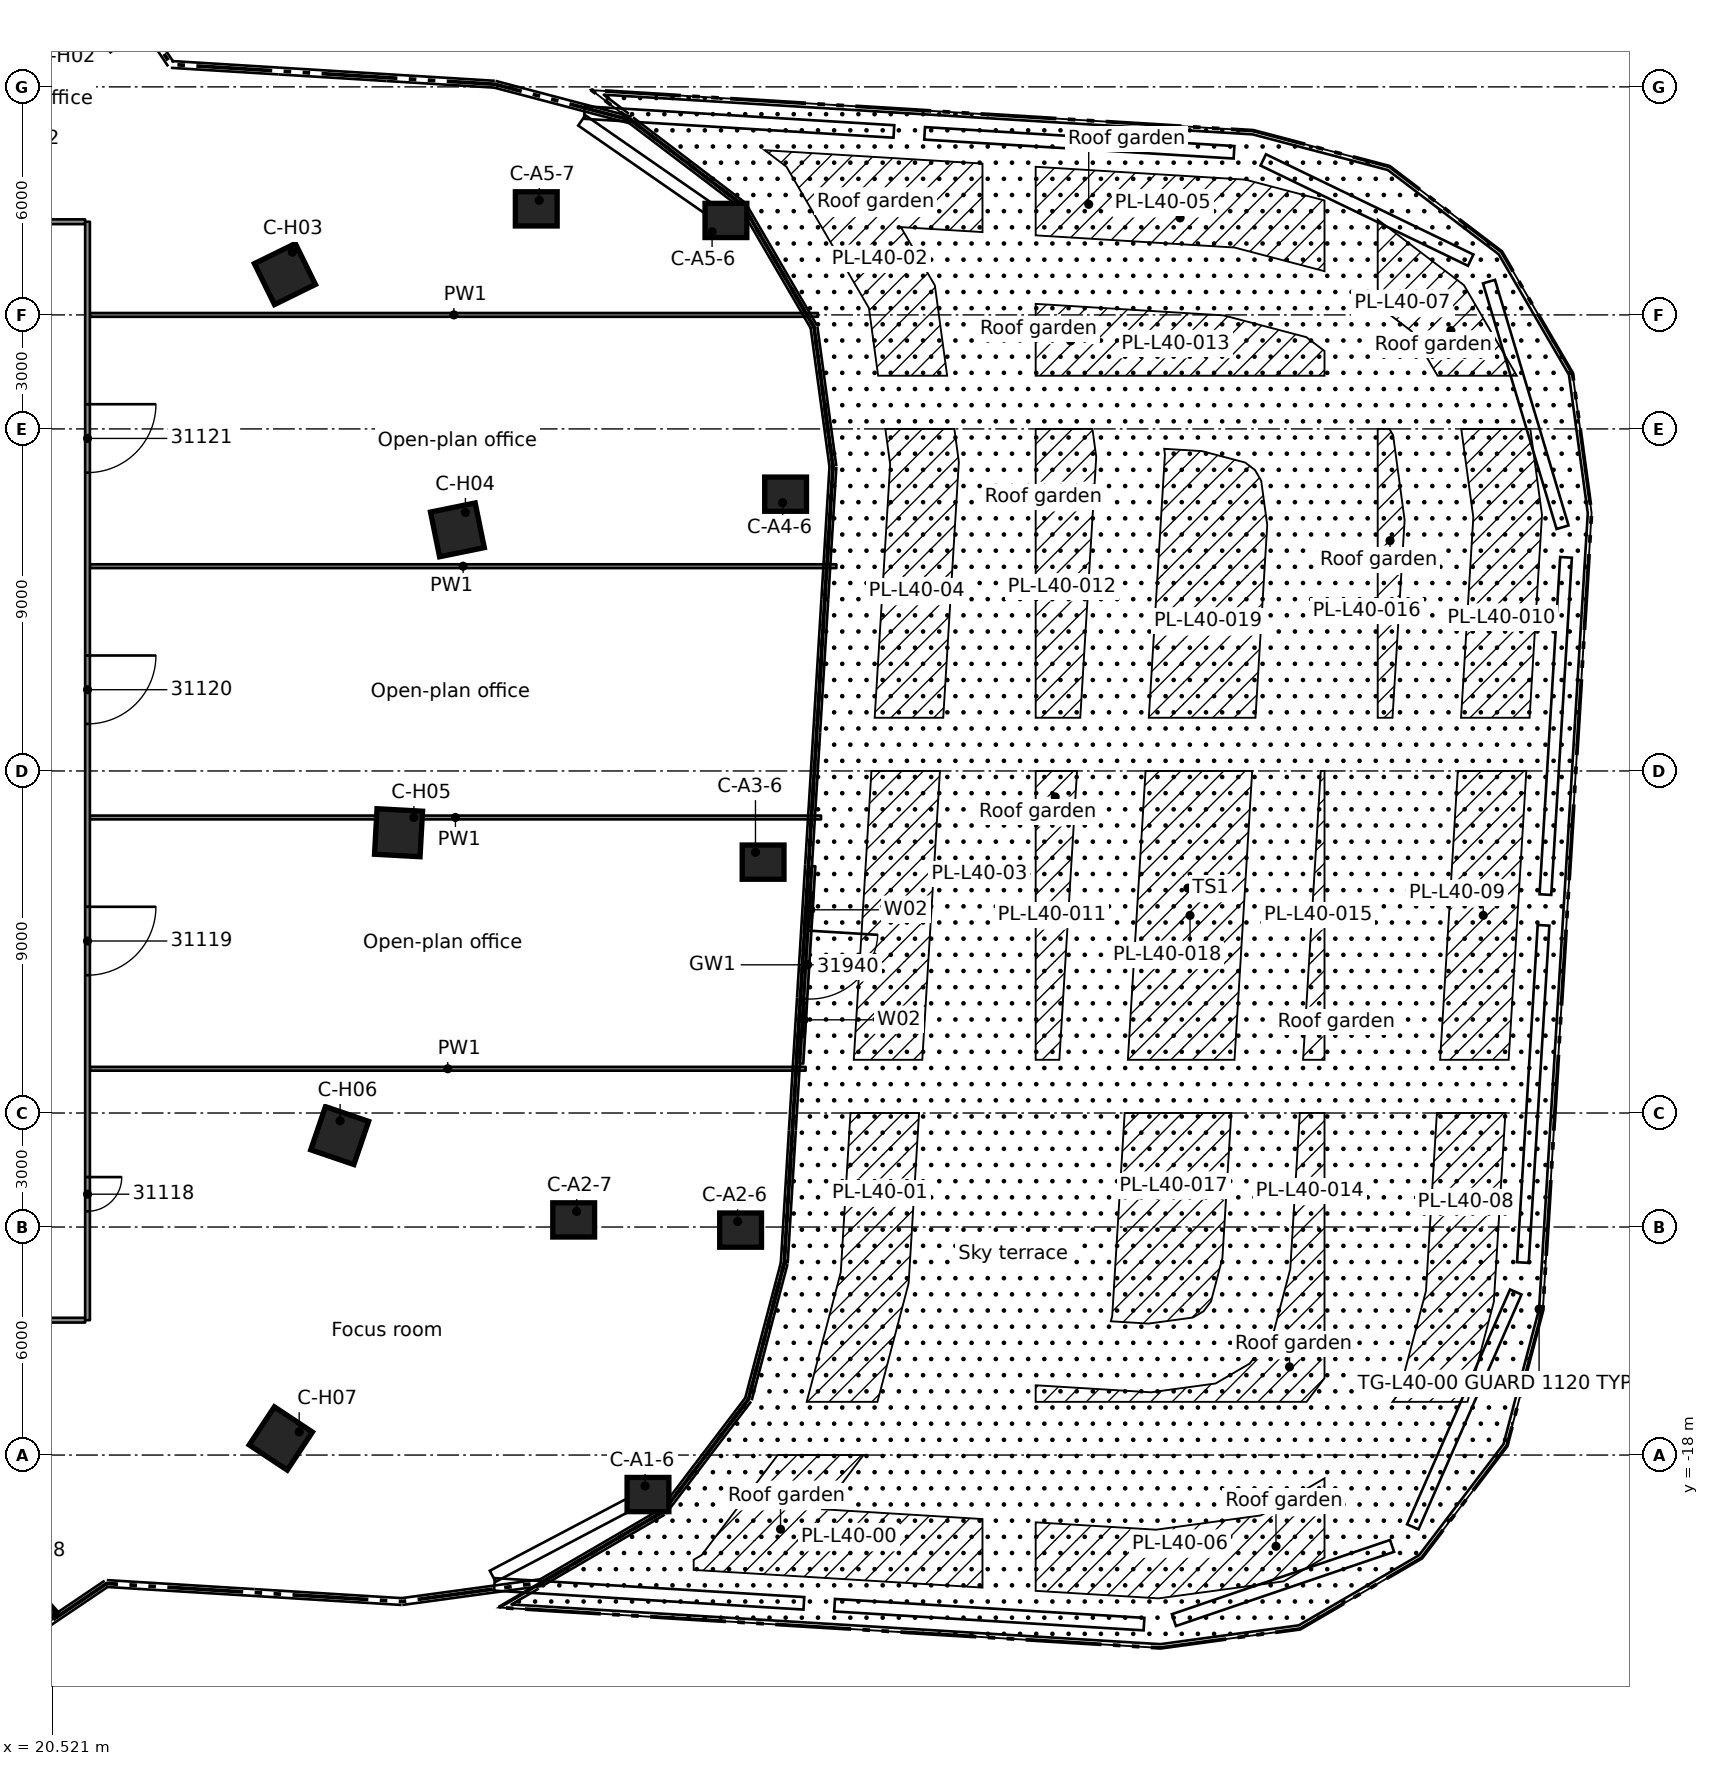
"""IFC4 building model, lengths in metres.
Left out: names, types, materials, properties, quantities, classifications, styles, units other than length and angle.
Written with IfcOpenShell. Run it as: python <this file> out.ifc"""

import sys

from ifc_helpers import new_model, si_unit, direction, frame, frame_2d, origin, origin_2d, place, context, subcontext, project, spatial, rectangle, extrude, element, fill, save


model = new_model("IFC4")
c1 = context("Model", 3, precision=1e-05, world=origin(), true_north=direction((0.0, 1.0)))
c2 = subcontext(c1, "Body", "Model", "MODEL_VIEW")
j1 = project(units=[si_unit("LENGTHUNIT", "METRE"), si_unit("PLANEANGLEUNIT", "RADIAN")], contexts=[c1])
p1 = place(None, origin())
s1 = spatial("IfcSite", under=j1, at=p1, CompositionType="ELEMENT")
p2 = place(p1, origin())
s2 = spatial("IfcBuilding", under=s1, at=p2, CompositionType="ELEMENT")
p3 = place(p2, frame((0.0, 0.0, 156.1)))
s3 = spatial("IfcBuildingStorey", under=s2, at=p3, CompositionType="ELEMENT", Elevation=156.1)
for number, where, z_axis, x_axis in (
    (1, (36.198, -19.039, 0.0), (0.0, 0.0, 1.0), (1.0, 0.0, 0.0)),
    (2, (38.635, -12.081, 0.0), (0.0, 0.0, 1.0), (1.0, 0.0, 0.0)),
    (3, (34.243, -11.813, 0.0), (0.0, 0.0, 1.0), (1.0, 0.0, 0.0)),
    (4, (39.227, -2.399, 0.0), (0.0, 0.0, 1.0), (1.0, 0.0, 0.0)),
    (5, (39.819, 7.283, 0.0), (0.0, 0.0, 1.0), (1.0, 0.0, 0.0)),
    (6, (38.249, 14.485, 0.0), (0.0, 0.0, 1.0), (1.0, 0.0, 0.0)),
    (7, (33.258, 14.79, 0.0), (0.0, 0.0, 1.0), (1.0, 0.0, 0.0)),
):
    element("IfcColumn", number, at=place(p3, frame(where, z_axis=z_axis, x_axis=x_axis)), inside=s3, PredefinedType="COLUMN", context=c2, shape_type="SweptSolid", body=[
        extrude(rectangle(XDim=1.1, YDim=0.9, at=origin_2d()), origin(), (0.0, 0.0, 1.0), 3.5),
    ])
for number, where, z_axis, x_axis in (
    (8, (26.644, 13.075, 0.0), (0.0, 0.0, 1.0), (0.898, 0.441, 0.0)),
    (9, (31.183, 6.344, 0.0), (0.0, 0.0, 1.0), (0.98, 0.199, 0.0)),
    (10, (29.634, -1.625, 0.0), (0.0, 0.0, 1.0), (0.998, -0.055, 0.0)),
    (11, (28.085, -9.594, 0.0), (0.0, 0.0, 1.0), (0.946, -0.323, 0.0)),
    (12, (26.536, -17.564, 0.0), (0.0, 0.0, 1.0), (0.834, -0.552, 0.0)),
    (13, (19.806, -22.104, 0.0), (0.0, 0.0, 1.0), (0.667, -0.745, 0.0)),
):
    element("IfcColumn", number, at=place(p3, frame(where, z_axis=z_axis, x_axis=x_axis)), inside=s3, PredefinedType="COLUMN", context=c2, shape_type="SweptSolid", body=[
        extrude(rectangle(XDim=1.2, YDim=1.2, at=origin_2d()), origin(), (0.0, 0.0, 1.0), 3.5),
    ])
p4 = place(p3, frame((40.552, -2.505, 0.0), z_axis=(0.0, 0.0, 1.0), x_axis=(-0.061033697925, -0.998135706063, 0.0)))
e14 = element("IfcWall", 14, at=p4, inside=s3, PredefinedType="STANDARD", context=c2, shape_type="SweptSolid", body=[
    extrude(rectangle(XDim=5.2, YDim=0.1, at=frame_2d((2.6, 0.0))), origin(), (0.0, 0.0, 1.0), 3.1),
])
p5 = place(p4, frame((1.7, 0.0, 0.0)))
e15 = element("IfcOpeningElement", 15, at=p5, cuts=e14, PredefinedType="OPENING", context=c2, shape_type="SweptSolid", body=[
    extrude(rectangle(XDim=1.8, YDim=2.4, at=frame_2d((0.9, 1.2))), frame((0.0, 0.06, 0.0), z_axis=(0.0, -1.0, 0.0), x_axis=(1.0, 0.0, 0.0)), (0.0, 0.0, 1.0), 0.12),
])
p6 = place(p4, frame((0.7, 0.0, 0.0)))
e16 = element("IfcOpeningElement", 16, at=p6, cuts=e14, PredefinedType="OPENING", context=c2, shape_type="SweptSolid", body=[
    extrude(rectangle(XDim=0.9, YDim=2.4, at=frame_2d((0.45, 1.2))), frame((0.0, 0.06, 0.0), z_axis=(0.0, -1.0, 0.0), x_axis=(1.0, 0.0, 0.0)), (0.0, 0.0, 1.0), 0.12),
])
p7 = place(p4, frame((3.6, 0.0, 0.0)))
e17 = element("IfcOpeningElement", 17, at=p7, cuts=e14, PredefinedType="OPENING", context=c2, shape_type="SweptSolid", body=[
    extrude(rectangle(XDim=0.9, YDim=2.4, at=frame_2d((0.45, 1.2))), frame((0.0, 0.06, 0.0), z_axis=(0.0, -1.0, 0.0), x_axis=(1.0, 0.0, 0.0)), (0.0, 0.0, 1.0), 0.12),
])
p8 = place(p3, frame((21.387, -14.451, 0.0), z_axis=(0.0, 0.0, 1.0), x_axis=(-1.0, 0.0, 0.0)))
e18 = element("IfcWall", 18, at=p8, inside=s3, PredefinedType="PARTITIONING", context=c2, shape_type="SweptSolid", body=[
    extrude(rectangle(XDim=10.996, YDim=0.125, at=frame_2d((5.498, 0.0))), origin(), (0.0, 0.0, 1.0), 3.08),
])
p9 = place(p8, frame((7.816, 0.0, 0.0)))
e19 = element("IfcOpeningElement", 19, at=p9, cuts=e18, PredefinedType="OPENING", context=c2, shape_type="SweptSolid", body=[
    extrude(rectangle(XDim=0.9, YDim=2.1, at=frame_2d((0.45, 1.05))), frame((0.0, 0.073, 0.0), z_axis=(0.0, -1.0, 0.0), x_axis=(1.0, 0.0, 0.0)), (0.0, 0.0, 1.0), 0.145),
])
p10 = place(p8, frame((2.288, 0.0, 0.0)))
e20 = element("IfcOpeningElement", 20, at=p10, cuts=e18, PredefinedType="OPENING", context=c2, shape_type="SweptSolid", body=[
    extrude(rectangle(XDim=0.9, YDim=2.1, at=frame_2d((0.45, 1.05))), frame((0.0, 0.073, 0.0), z_axis=(0.0, -1.0, 0.0), x_axis=(1.0, 0.0, 0.0)), (0.0, 0.0, 1.0), 0.145),
])
p11 = place(p3, frame((21.512, -7.836, 0.0), z_axis=(0.0, 0.0, 1.0), x_axis=(1.0, 0.0, 0.0)))
e21 = element("IfcWall", 21, at=p11, inside=s3, PredefinedType="PARTITIONING", context=c2, shape_type="SweptSolid", body=[
    extrude(rectangle(XDim=18.834, YDim=0.1, at=frame_2d((9.417, 0.0))), origin(), (0.0, 0.0, 1.0), 3.08),
])
p12 = place(p3, frame((21.512, -1.224, 0.0), z_axis=(0.0, 0.0, 1.0), x_axis=(1.0, 0.0, 0.0)))
e22 = element("IfcWall", 22, at=p12, inside=s3, PredefinedType="PARTITIONING", context=c2, shape_type="SweptSolid", body=[
    extrude(rectangle(XDim=19.239, YDim=0.1, at=frame_2d((9.62, 0.0))), origin(), (0.0, 0.0, 1.0), 3.08),
])
p13 = place(p3, frame((21.512, 5.388, 0.0), z_axis=(0.0, 0.0, 1.0), x_axis=(1.0, 0.0, 0.0)))
e23 = element("IfcWall", 23, at=p13, inside=s3, PredefinedType="PARTITIONING", context=c2, shape_type="SweptSolid", body=[
    extrude(rectangle(XDim=19.643, YDim=0.1, at=frame_2d((9.822, 0.0))), origin(), (0.0, 0.0, 1.0), 3.08),
])
p14 = place(p3, frame((21.512, 12.0, 0.0), z_axis=(0.0, 0.0, 1.0), x_axis=(1.0, 0.0, 0.0)))
e24 = element("IfcWall", 24, at=p14, inside=s3, PredefinedType="PARTITIONING", context=c2, shape_type="SweptSolid", body=[
    extrude(rectangle(XDim=19.157, YDim=0.1, at=frame_2d((9.579, 0.0))), origin(), (0.0, 0.0, 1.0), 3.08),
])
p15 = place(p3, frame((10.391, 14.451, 0.0), z_axis=(0.0, 0.0, 1.0), x_axis=(1.0, 0.0, 0.0)))
e25 = element("IfcWall", 25, at=p15, inside=s3, PredefinedType="PARTITIONING", context=c2, shape_type="SweptSolid", body=[
    extrude(rectangle(XDim=10.996, YDim=0.125, at=frame_2d((5.498, 0.0))), origin(), (0.0, 0.0, 1.0), 3.08),
])
p16 = place(p15, frame((7.38, 0.0, 0.0)))
e26 = element("IfcOpeningElement", 26, at=p16, cuts=e25, PredefinedType="OPENING", context=c2, shape_type="SweptSolid", body=[
    extrude(rectangle(XDim=1.8, YDim=2.1, at=frame_2d((0.9, 1.05))), frame((0.0, 0.073, 0.0), z_axis=(0.0, -1.0, 0.0), x_axis=(1.0, 0.0, 0.0)), (0.0, 0.0, 1.0), 0.145),
])
p17 = place(p3, frame((21.45, 14.451, 0.0), z_axis=(0.0, 0.0, 1.0), x_axis=(0.0, -1.0, 0.0)))
e27 = element("IfcWall", 27, at=p17, inside=s3, PredefinedType="PARTITIONING", context=c2, shape_type="SweptSolid", body=[
    extrude(rectangle(XDim=28.902, YDim=0.125, at=frame_2d((14.451, 0.0))), origin(), (0.0, 0.0, 1.0), 3.08),
])
p18 = place(p17, frame((25.137, 0.0, 0.0)))
e28 = element("IfcOpeningElement", 28, at=p18, cuts=e27, PredefinedType="OPENING", context=c2, shape_type="SweptSolid", body=[
    extrude(rectangle(XDim=0.9, YDim=2.1, at=frame_2d((0.45, 1.05))), frame((0.0, 0.073, 0.0), z_axis=(0.0, -1.0, 0.0), x_axis=(1.0, 0.0, 0.0)), (0.0, 0.0, 1.0), 0.145),
])
p19 = place(p17, frame((18.025, 0.0, 0.0)))
e29 = element("IfcOpeningElement", 29, at=p19, cuts=e27, PredefinedType="OPENING", context=c2, shape_type="SweptSolid", body=[
    extrude(rectangle(XDim=1.8, YDim=2.1, at=frame_2d((0.9, 1.05))), frame((0.0, 0.073, 0.0), z_axis=(0.0, -1.0, 0.0), x_axis=(1.0, 0.0, 0.0)), (0.0, 0.0, 1.0), 0.145),
])
p20 = place(p17, frame((11.413, 0.0, 0.0)))
e30 = element("IfcOpeningElement", 30, at=p20, cuts=e27, PredefinedType="OPENING", context=c2, shape_type="SweptSolid", body=[
    extrude(rectangle(XDim=1.8, YDim=2.1, at=frame_2d((0.9, 1.05))), frame((0.0, 0.073, 0.0), z_axis=(0.0, -1.0, 0.0), x_axis=(1.0, 0.0, 0.0)), (0.0, 0.0, 1.0), 0.145),
])
p21 = place(p17, frame((4.801, 0.0, 0.0)))
e31 = element("IfcOpeningElement", 31, at=p21, cuts=e27, PredefinedType="OPENING", context=c2, shape_type="SweptSolid", body=[
    extrude(rectangle(XDim=1.8, YDim=2.1, at=frame_2d((0.9, 1.05))), frame((0.0, 0.073, 0.0), z_axis=(0.0, -1.0, 0.0), x_axis=(1.0, 0.0, 0.0)), (0.0, 0.0, 1.0), 0.145),
])
p22 = place(p5, origin())
e32 = element("IfcDoor", 32, at=p22, inside=s3, OperationType="DOUBLE_DOOR_SINGLE_SWING", PredefinedType="DOOR", context=c2, shape_type="SweptSolid", body=[
    extrude(rectangle(XDim=1.8, YDim=2.4, at=frame_2d((0.9, 1.2))), frame((0.0, 0.025, 0.0), z_axis=(0.0, -1.0, 0.0), x_axis=(1.0, 0.0, 0.0)), (0.0, 0.0, 1.0), 0.05),
])
fill(e15, e32)
p23 = place(p6, origin())
e33 = element("IfcWindow", 33, at=p23, inside=s3, PartitioningType="SINGLE_PANEL", PredefinedType="WINDOW", context=c2, shape_type="SweptSolid", body=[
    extrude(rectangle(XDim=0.9, YDim=2.4, at=frame_2d((0.45, 1.2))), frame((0.0, 0.03, 0.0), z_axis=(0.0, -1.0, 0.0), x_axis=(1.0, 0.0, 0.0)), (0.0, 0.0, 1.0), 0.06),
])
fill(e16, e33)
p24 = place(p7, origin())
e34 = element("IfcWindow", 34, at=p24, inside=s3, PartitioningType="SINGLE_PANEL", PredefinedType="WINDOW", context=c2, shape_type="SweptSolid", body=[
    extrude(rectangle(XDim=0.9, YDim=2.4, at=frame_2d((0.45, 1.2))), frame((0.0, 0.03, 0.0), z_axis=(0.0, -1.0, 0.0), x_axis=(1.0, 0.0, 0.0)), (0.0, 0.0, 1.0), 0.06),
])
fill(e17, e34)
p25 = place(p18, origin())
e35 = element("IfcDoor", 35, at=p25, inside=s3, OperationType="SINGLE_SWING_RIGHT", PredefinedType="DOOR", context=c2, shape_type="SweptSolid", body=[
    extrude(rectangle(XDim=0.9, YDim=2.1, at=frame_2d((0.45, 1.05))), frame((0.0, 0.025, 0.0), z_axis=(0.0, -1.0, 0.0), x_axis=(1.0, 0.0, 0.0)), (0.0, 0.0, 1.0), 0.05),
])
fill(e28, e35)
p26 = place(p19, origin())
e36 = element("IfcDoor", 36, at=p26, inside=s3, OperationType="DOUBLE_DOOR_SINGLE_SWING", PredefinedType="DOOR", context=c2, shape_type="SweptSolid", body=[
    extrude(rectangle(XDim=1.8, YDim=2.1, at=frame_2d((0.9, 1.05))), frame((0.0, 0.025, 0.0), z_axis=(0.0, -1.0, 0.0), x_axis=(1.0, 0.0, 0.0)), (0.0, 0.0, 1.0), 0.05),
])
fill(e29, e36)
p27 = place(p20, origin())
e37 = element("IfcDoor", 37, at=p27, inside=s3, OperationType="DOUBLE_DOOR_SINGLE_SWING", PredefinedType="DOOR", context=c2, shape_type="SweptSolid", body=[
    extrude(rectangle(XDim=1.8, YDim=2.1, at=frame_2d((0.9, 1.05))), frame((0.0, 0.025, 0.0), z_axis=(0.0, -1.0, 0.0), x_axis=(1.0, 0.0, 0.0)), (0.0, 0.0, 1.0), 0.05),
])
fill(e30, e37)
p28 = place(p21, origin())
e38 = element("IfcDoor", 38, at=p28, inside=s3, OperationType="DOUBLE_DOOR_SINGLE_SWING", PredefinedType="DOOR", context=c2, shape_type="SweptSolid", body=[
    extrude(rectangle(XDim=1.8, YDim=2.1, at=frame_2d((0.9, 1.05))), frame((0.0, 0.025, 0.0), z_axis=(0.0, -1.0, 0.0), x_axis=(1.0, 0.0, 0.0)), (0.0, 0.0, 1.0), 0.05),
])
fill(e31, e38)
save(model, sys.argv[1])
